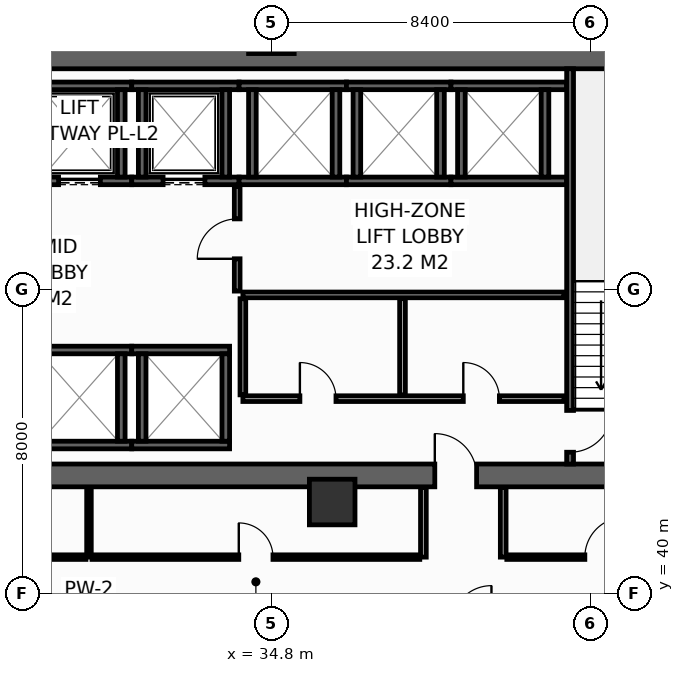
"""IFC4 building model, lengths in metres.
Left out: names, types, materials, properties, quantities, classifications, styles, units other than length and angle.
Written with IfcOpenShell. Run it as: python <this file> out.ifc"""

import sys

from ifc_helpers import new_model, si_unit, direction, frame, frame_2d, origin, origin_2d, place, context, subcontext, project, spatial, rectangle, hollow_rectangle, extrude, element, fill, save


model = new_model("IFC4")
c1 = context("Model", 3, precision=1e-05, world=origin(), true_north=direction((0.0, 1.0)))
c2 = subcontext(c1, "Body", "Model", "MODEL_VIEW")
j1 = project(units=[si_unit("LENGTHUNIT", "METRE"), si_unit("PLANEANGLEUNIT", "RADIAN")], contexts=[c1])
p1 = place(None, origin())
s1 = spatial("IfcSite", under=j1, at=p1, CompositionType="ELEMENT")
p2 = place(p1, origin())
s2 = spatial("IfcBuilding", under=s1, at=p2, CompositionType="ELEMENT")
p3 = place(p2, frame((0.0, 0.0, 51.6)))
s3 = spatial("IfcBuildingStorey", under=s2, at=p3, CompositionType="ELEMENT", Elevation=51.6)
p4 = place(p3, frame((13.5, 43.1, 0.0), z_axis=(0.0, 0.0, 1.0), x_axis=(1.0, 0.0, 0.0)))
e1 = element("IfcWall", 1, at=p4, inside=s3, PredefinedType="SHEAR", context=c2, shape_type="SweptSolid", body=[
    extrude(rectangle(XDim=32.9, YDim=0.6, at=frame_2d((16.45, 0.0))), origin(), (0.0, 0.0, 1.0), 4.15),
])
p5 = place(p4, frame((5.4, 0.0, 0.0)))
e2 = element("IfcOpeningElement", 2, at=p5, cuts=e1, PredefinedType="OPENING", context=c2, shape_type="SweptSolid", body=[
    extrude(rectangle(XDim=1.1, YDim=2.15, at=frame_2d((0.55, 1.075))), frame((0.0, 0.31, 0.0), z_axis=(0.0, -1.0, 0.0), x_axis=(1.0, 0.0, 0.0)), (0.0, 0.0, 1.0), 0.62),
])
p6 = place(p4, frame((25.6, 0.0, 0.0)))
e3 = element("IfcOpeningElement", 3, at=p6, cuts=e1, PredefinedType="OPENING", context=c2, shape_type="SweptSolid", body=[
    extrude(rectangle(XDim=1.1, YDim=2.15, at=frame_2d((0.55, 1.075))), frame((0.0, 0.31, 0.0), z_axis=(0.0, -1.0, 0.0), x_axis=(1.0, 0.0, 0.0)), (0.0, 0.0, 1.0), 0.62),
])
p7 = place(p3, frame((13.5, 54.1, 0.0), z_axis=(0.0, 0.0, 1.0), x_axis=(1.0, 0.0, 0.0)))
e4 = element("IfcWall", 4, at=p7, inside=s3, PredefinedType="SHEAR", context=c2, shape_type="SweptSolid", body=[
    extrude(rectangle(XDim=32.9, YDim=0.6, at=frame_2d((16.45, 0.0))), origin(), (0.0, 0.0, 1.0), 4.15),
])
for number, where, z_axis, x_axis in (
    (5, (34.8, 54.8, 0.0), (0.0, 0.0, 1.0), (1.0, 0.0, 0.0)),
    (6, (36.4, 42.4, 0.0), (0.0, 0.0, 1.0), (1.0, 0.0, 0.0)),
):
    element("IfcColumn", number, at=place(p3, frame(where, z_axis=z_axis, x_axis=x_axis)), inside=s3, PredefinedType="COLUMN", context=c2, shape_type="SweptSolid", body=[
        extrude(hollow_rectangle(XDim=1.2, YDim=1.2, WallThickness=0.055, at=origin_2d()), origin(), (0.0, 0.0, 1.0), 4.4),
    ])
p8 = place(p3, frame((28.375, 50.85, 0.0), z_axis=(0.0, 0.0, 1.0), x_axis=(1.0, 0.0, 0.0)))
e7 = element("IfcWall", 7, at=p8, inside=s3, PredefinedType="SHEAR", context=c2, shape_type="SweptSolid", body=[
    extrude(rectangle(XDim=2.75, YDim=0.2, at=frame_2d((1.375, 0.0))), origin(), (0.0, 0.0, 1.0), 4.15),
])
p9 = place(p8, frame((0.825, 0.0, 0.0)))
e8 = element("IfcOpeningElement", 8, at=p9, cuts=e7, PredefinedType="OPENING", context=c2, shape_type="SweptSolid", body=[
    extrude(rectangle(XDim=1.1, YDim=2.2, at=frame_2d((0.55, 1.1))), frame((0.0, 0.11, 0.0), z_axis=(0.0, -1.0, 0.0), x_axis=(1.0, 0.0, 0.0)), (0.0, 0.0, 1.0), 0.22),
])
p10 = place(p3, frame((28.375, 53.35, 0.0), z_axis=(0.0, 0.0, 1.0), x_axis=(1.0, 0.0, 0.0)))
e9 = element("IfcWall", 9, at=p10, inside=s3, PredefinedType="SHEAR", context=c2, shape_type="SweptSolid", body=[
    extrude(rectangle(XDim=2.75, YDim=0.2, at=frame_2d((1.375, 0.0))), origin(), (0.0, 0.0, 1.0), 4.15),
])
p11 = place(p3, frame((30.85, 50.95, 0.0), z_axis=(0.0, 0.0, 1.0), x_axis=(0.0, 1.0, 0.0)))
e10 = element("IfcWall", 10, at=p11, inside=s3, PredefinedType="SHEAR", context=c2, shape_type="SweptSolid", body=[
    extrude(rectangle(XDim=2.3, YDim=0.2, at=frame_2d((1.15, 0.0))), origin(), (0.0, 0.0, 1.0), 4.15),
])
p12 = place(p3, frame((31.125, 50.85, 0.0), z_axis=(0.0, 0.0, 1.0), x_axis=(1.0, 0.0, 0.0)))
e11 = element("IfcWall", 11, at=p12, inside=s3, PredefinedType="SHEAR", context=c2, shape_type="SweptSolid", body=[
    extrude(rectangle(XDim=2.825, YDim=0.2, at=frame_2d((1.413, 0.0))), origin(), (0.0, 0.0, 1.0), 4.15),
])
p13 = place(p12, frame((0.825, 0.0, 0.0)))
e12 = element("IfcOpeningElement", 12, at=p13, cuts=e11, PredefinedType="OPENING", context=c2, shape_type="SweptSolid", body=[
    extrude(rectangle(XDim=1.1, YDim=2.2, at=frame_2d((0.55, 1.1))), frame((0.0, 0.11, 0.0), z_axis=(0.0, -1.0, 0.0), x_axis=(1.0, 0.0, 0.0)), (0.0, 0.0, 1.0), 0.22),
])
p14 = place(p3, frame((31.125, 53.35, 0.0), z_axis=(0.0, 0.0, 1.0), x_axis=(1.0, 0.0, 0.0)))
e13 = element("IfcWall", 13, at=p14, inside=s3, PredefinedType="SHEAR", context=c2, shape_type="SweptSolid", body=[
    extrude(rectangle(XDim=2.825, YDim=0.2, at=frame_2d((1.413, 0.0))), origin(), (0.0, 0.0, 1.0), 4.15),
])
for number, where, z_axis, x_axis in (
    (14, (31.4, 50.95, 0.0), (0.0, 0.0, 1.0), (0.0, 1.0, 0.0)),
    (15, (33.6, 50.95, 0.0), (0.0, 0.0, 1.0), (0.0, 1.0, 0.0)),
):
    element("IfcWall", number, at=place(p3, frame(where, z_axis=z_axis, x_axis=x_axis)), inside=s3, PredefinedType="SHEAR", context=c2, shape_type="SweptSolid", body=[
        extrude(rectangle(XDim=2.3, YDim=0.2, at=frame_2d((1.15, 0.0))), origin(), (0.0, 0.0, 1.0), 4.15),
    ])
for number, where, z_axis, x_axis in (
    (16, (28.375, 43.9, 0.0), (0.0, 0.0, 1.0), (1.0, 0.0, 0.0)),
    (17, (28.375, 46.4, 0.0), (0.0, 0.0, 1.0), (1.0, 0.0, 0.0)),
):
    element("IfcWall", number, at=place(p3, frame(where, z_axis=z_axis, x_axis=x_axis)), inside=s3, PredefinedType="SHEAR", context=c2, shape_type="SweptSolid", body=[
        extrude(rectangle(XDim=2.75, YDim=0.2, at=frame_2d((1.375, 0.0))), origin(), (0.0, 0.0, 1.0), 4.15),
    ])
p15 = place(p3, frame((30.85, 44.0, 0.0), z_axis=(0.0, 0.0, 1.0), x_axis=(0.0, 1.0, 0.0)))
e18 = element("IfcWall", 18, at=p15, inside=s3, PredefinedType="SHEAR", context=c2, shape_type="SweptSolid", body=[
    extrude(rectangle(XDim=2.3, YDim=0.2, at=frame_2d((1.15, 0.0))), origin(), (0.0, 0.0, 1.0), 4.15),
])
for number, where, z_axis, x_axis in (
    (19, (31.125, 43.9, 0.0), (0.0, 0.0, 1.0), (1.0, 0.0, 0.0)),
    (20, (31.125, 46.4, 0.0), (0.0, 0.0, 1.0), (1.0, 0.0, 0.0)),
):
    element("IfcWall", number, at=place(p3, frame(where, z_axis=z_axis, x_axis=x_axis)), inside=s3, PredefinedType="SHEAR", context=c2, shape_type="SweptSolid", body=[
        extrude(rectangle(XDim=2.575, YDim=0.2, at=frame_2d((1.288, 0.0))), origin(), (0.0, 0.0, 1.0), 4.15),
    ])
for number, where, z_axis, x_axis in (
    (21, (31.4, 44.0, 0.0), (0.0, 0.0, 1.0), (0.0, 1.0, 0.0)),
    (22, (33.6, 44.0, 0.0), (0.0, 0.0, 1.0), (0.0, 1.0, 0.0)),
):
    element("IfcWall", number, at=place(p3, frame(where, z_axis=z_axis, x_axis=x_axis)), inside=s3, PredefinedType="SHEAR", context=c2, shape_type="SweptSolid", body=[
        extrude(rectangle(XDim=2.3, YDim=0.2, at=frame_2d((1.15, 0.0))), origin(), (0.0, 0.0, 1.0), 4.15),
    ])
for number, where, z_axis, x_axis in (
    (23, (33.95, 50.85, 0.0), (0.0, 0.0, 1.0), (1.0, 0.0, 0.0)),
    (24, (33.95, 53.35, 0.0), (0.0, 0.0, 1.0), (1.0, 0.0, 0.0)),
):
    element("IfcWall", number, at=place(p3, frame(where, z_axis=z_axis, x_axis=x_axis)), inside=s3, PredefinedType="SHEAR", context=c2, shape_type="SweptSolid", body=[
        extrude(rectangle(XDim=2.825, YDim=0.2, at=frame_2d((1.413, 0.0))), origin(), (0.0, 0.0, 1.0), 4.15),
    ])
for number, where, z_axis, x_axis in (
    (25, (34.3, 50.95, 0.0), (0.0, 0.0, 1.0), (0.0, 1.0, 0.0)),
    (26, (36.5, 50.95, 0.0), (0.0, 0.0, 1.0), (0.0, 1.0, 0.0)),
):
    element("IfcWall", number, at=place(p3, frame(where, z_axis=z_axis, x_axis=x_axis)), inside=s3, PredefinedType="SHEAR", context=c2, shape_type="SweptSolid", body=[
        extrude(rectangle(XDim=2.3, YDim=0.2, at=frame_2d((1.15, 0.0))), origin(), (0.0, 0.0, 1.0), 4.15),
    ])
for number, where, z_axis, x_axis in (
    (27, (36.775, 50.85, 0.0), (0.0, 0.0, 1.0), (1.0, 0.0, 0.0)),
    (28, (36.775, 53.35, 0.0), (0.0, 0.0, 1.0), (1.0, 0.0, 0.0)),
):
    element("IfcWall", number, at=place(p3, frame(where, z_axis=z_axis, x_axis=x_axis)), inside=s3, PredefinedType="SHEAR", context=c2, shape_type="SweptSolid", body=[
        extrude(rectangle(XDim=2.75, YDim=0.2, at=frame_2d((1.375, 0.0))), origin(), (0.0, 0.0, 1.0), 4.15),
    ])
for number, where, z_axis, x_axis in (
    (29, (37.05, 50.95, 0.0), (0.0, 0.0, 1.0), (0.0, 1.0, 0.0)),
    (30, (39.25, 50.95, 0.0), (0.0, 0.0, 1.0), (0.0, 1.0, 0.0)),
):
    element("IfcWall", number, at=place(p3, frame(where, z_axis=z_axis, x_axis=x_axis)), inside=s3, PredefinedType="SHEAR", context=c2, shape_type="SweptSolid", body=[
        extrude(rectangle(XDim=2.3, YDim=0.2, at=frame_2d((1.15, 0.0))), origin(), (0.0, 0.0, 1.0), 4.15),
    ])
for number, where, z_axis, x_axis in (
    (31, (39.525, 50.85, 0.0), (0.0, 0.0, 1.0), (1.0, 0.0, 0.0)),
    (32, (39.525, 53.35, 0.0), (0.0, 0.0, 1.0), (1.0, 0.0, 0.0)),
):
    element("IfcWall", number, at=place(p3, frame(where, z_axis=z_axis, x_axis=x_axis)), inside=s3, PredefinedType="SHEAR", context=c2, shape_type="SweptSolid", body=[
        extrude(rectangle(XDim=3.045, YDim=0.2, at=frame_2d((1.522, 0.0))), origin(), (0.0, 0.0, 1.0), 4.15),
    ])
for number, where, z_axis, x_axis in (
    (33, (39.8, 50.95, 0.0), (0.0, 0.0, 1.0), (0.0, 1.0, 0.0)),
    (34, (42.0, 50.95, 0.0), (0.0, 0.0, 1.0), (0.0, 1.0, 0.0)),
):
    element("IfcWall", number, at=place(p3, frame(where, z_axis=z_axis, x_axis=x_axis)), inside=s3, PredefinedType="SHEAR", context=c2, shape_type="SweptSolid", body=[
        extrude(rectangle(XDim=2.3, YDim=0.2, at=frame_2d((1.15, 0.0))), origin(), (0.0, 0.0, 1.0), 4.15),
    ])
p16 = place(p3, frame((42.66, 53.8, 0.0), z_axis=(0.0, 0.0, 1.0), x_axis=(0.0, -1.0, 0.0)))
e35 = element("IfcWall", 35, at=p16, inside=s3, PredefinedType="SHEAR", context=c2, shape_type="SweptSolid", body=[
    extrude(rectangle(XDim=10.4, YDim=0.18, at=frame_2d((5.2, 0.0))), origin(), (0.0, 0.0, 1.0), 4.15),
])
p17 = place(p16, frame((8.99, 0.0, 0.0)))
e36 = element("IfcOpeningElement", 36, at=p17, cuts=e35, PredefinedType="OPENING", context=c2, shape_type="SweptSolid", body=[
    extrude(rectangle(XDim=1.1, YDim=2.15, at=frame_2d((0.55, 1.075))), frame((0.0, 0.1, 0.0), z_axis=(0.0, -1.0, 0.0), x_axis=(1.0, 0.0, 0.0)), (0.0, 0.0, 1.0), 0.2),
])
p18 = place(p3, frame((33.9, 47.95, 0.0), z_axis=(0.0, 0.0, 1.0), x_axis=(0.0, 1.0, 0.0)))
e37 = element("IfcWall", 37, at=p18, inside=s3, PredefinedType="PARTITIONING", context=c2, shape_type="SweptSolid", body=[
    extrude(rectangle(XDim=2.75, YDim=0.15, at=frame_2d((1.375, 0.0))), origin(), (0.0, 0.0, 1.0), 4.15),
])
p19 = place(p18, frame((0.85, 0.0, 0.0)))
e38 = element("IfcOpeningElement", 38, at=p19, cuts=e37, PredefinedType="OPENING", context=c2, shape_type="SweptSolid", body=[
    extrude(rectangle(XDim=1.05, YDim=2.15, at=frame_2d((0.525, 1.075))), frame((0.0, 0.085, 0.0), z_axis=(0.0, -1.0, 0.0), x_axis=(1.0, 0.0, 0.0)), (0.0, 0.0, 1.0), 0.17),
])
p20 = place(p3, frame((34.05, 45.12, 0.0), z_axis=(0.0, 0.0, 1.0), x_axis=(1.0, 0.0, 0.0)))
e39 = element("IfcWall", 39, at=p20, inside=s3, PredefinedType="PARTITIONING", context=c2, shape_type="SweptSolid", body=[
    extrude(rectangle(XDim=8.45, YDim=0.15, at=frame_2d((4.225, 0.0))), origin(), (0.0, 0.0, 1.0), 4.15),
])
p21 = place(p20, frame((1.5, 0.0, 0.0)))
e40 = element("IfcOpeningElement", 40, at=p21, cuts=e39, PredefinedType="OPENING", context=c2, shape_type="SweptSolid", body=[
    extrude(rectangle(XDim=0.95, YDim=2.15, at=frame_2d((0.475, 1.075))), frame((0.0, 0.085, 0.0), z_axis=(0.0, -1.0, 0.0), x_axis=(1.0, 0.0, 0.0)), (0.0, 0.0, 1.0), 0.17),
])
p22 = place(p20, frame((5.8, 0.0, 0.0)))
e41 = element("IfcOpeningElement", 41, at=p22, cuts=e39, PredefinedType="OPENING", context=c2, shape_type="SweptSolid", body=[
    extrude(rectangle(XDim=0.95, YDim=2.15, at=frame_2d((0.475, 1.075))), frame((0.0, 0.085, 0.0), z_axis=(0.0, -1.0, 0.0), x_axis=(1.0, 0.0, 0.0)), (0.0, 0.0, 1.0), 0.17),
])
p23 = place(p3, frame((34.05, 47.85, 0.0), z_axis=(0.0, 0.0, 1.0), x_axis=(1.0, 0.0, 0.0)))
e42 = element("IfcWall", 42, at=p23, inside=s3, PredefinedType="PARTITIONING", context=c2, shape_type="SweptSolid", body=[
    extrude(rectangle(XDim=8.45, YDim=0.15, at=frame_2d((4.225, 0.0))), origin(), (0.0, 0.0, 1.0), 4.15),
])
for number, where, z_axis, x_axis in (
    (43, (38.25, 45.22, 0.0), (0.0, 0.0, 1.0), (0.0, 1.0, 0.0)),
    (44, (34.05, 45.22, 0.0), (0.0, 0.0, 1.0), (0.0, 1.0, 0.0)),
):
    element("IfcWall", number, at=place(p3, frame(where, z_axis=z_axis, x_axis=x_axis)), inside=s3, PredefinedType="PARTITIONING", context=c2, shape_type="SweptSolid", body=[
        extrude(rectangle(XDim=2.53, YDim=0.15, at=frame_2d((1.265, 0.0))), origin(), (0.0, 0.0, 1.0), 4.15),
    ])
for number, where, z_axis, x_axis in (
    (45, (38.8, 40.95, 0.0), (0.0, 0.0, 1.0), (0.0, 1.0, 0.0)),
    (46, (40.9, 40.95, 0.0), (0.0, 0.0, 1.0), (0.0, 1.0, 0.0)),
):
    element("IfcWall", number, at=place(p3, frame(where, z_axis=z_axis, x_axis=x_axis)), inside=s3, PredefinedType="PARTITIONING", context=c2, shape_type="SweptSolid", body=[
        extrude(rectangle(XDim=1.83, YDim=0.15, at=frame_2d((0.915, 0.0))), origin(), (0.0, 0.0, 1.0), 4.15),
    ])
p24 = place(p3, frame((30.0, 40.95, 0.0), z_axis=(0.0, 0.0, 1.0), x_axis=(0.0, 1.0, 0.0)))
e47 = element("IfcWall", 47, at=p24, inside=s3, PredefinedType="PARTITIONING", context=c2, shape_type="SweptSolid", body=[
    extrude(rectangle(XDim=1.83, YDim=0.12, at=frame_2d((0.915, 0.0))), origin(), (0.0, 0.0, 1.0), 3.335),
])
p25 = place(p3, frame((20.795, 40.95, 0.0), z_axis=(0.0, 0.0, 1.0), x_axis=(1.0, 0.0, 0.0)))
e48 = element("IfcWall", 48, at=p25, inside=s3, PredefinedType="PARTITIONING", context=c2, shape_type="SweptSolid", body=[
    extrude(rectangle(XDim=9.125, YDim=0.12, at=frame_2d((4.562, 0.0))), origin(), (0.0, 0.0, 1.0), 3.335),
])
p26 = place(p25, frame((4.037, 0.0, 0.0)))
e49 = element("IfcOpeningElement", 49, at=p26, cuts=e48, PredefinedType="OPENING", context=c2, shape_type="SweptSolid", body=[
    extrude(rectangle(XDim=1.05, YDim=2.15, at=frame_2d((0.525, 1.075))), frame((0.0, 0.07, 0.0), z_axis=(0.0, -1.0, 0.0), x_axis=(1.0, 0.0, 0.0)), (0.0, 0.0, 1.0), 0.14),
])
p27 = place(p3, frame((30.08, 40.95, 0.0), z_axis=(0.0, 0.0, 1.0), x_axis=(1.0, 0.0, 0.0)))
e50 = element("IfcWall", 50, at=p27, inside=s3, PredefinedType="PARTITIONING", context=c2, shape_type="SweptSolid", body=[
    extrude(rectangle(XDim=8.625, YDim=0.12, at=frame_2d((4.312, 0.0))), origin(), (0.0, 0.0, 1.0), 3.335),
])
p28 = place(p27, frame((3.862, 0.0, 0.0)))
e51 = element("IfcOpeningElement", 51, at=p28, cuts=e50, PredefinedType="OPENING", context=c2, shape_type="SweptSolid", body=[
    extrude(rectangle(XDim=0.9, YDim=2.1, at=frame_2d((0.45, 1.05))), frame((0.0, 0.07, 0.0), z_axis=(0.0, -1.0, 0.0), x_axis=(1.0, 0.0, 0.0)), (0.0, 0.0, 1.0), 0.14),
])
p29 = place(p3, frame((40.995, 40.95, 0.0), z_axis=(0.0, 0.0, 1.0), x_axis=(1.0, 0.0, 0.0)))
e52 = element("IfcWall", 52, at=p29, inside=s3, PredefinedType="PARTITIONING", context=c2, shape_type="SweptSolid", body=[
    extrude(rectangle(XDim=5.155, YDim=0.12, at=frame_2d((2.577, 0.0))), origin(), (0.0, 0.0, 1.0), 4.15),
])
p30 = place(p29, frame((2.053, 0.0, 0.0)))
e53 = element("IfcOpeningElement", 53, at=p30, cuts=e52, PredefinedType="OPENING", context=c2, shape_type="SweptSolid", body=[
    extrude(rectangle(XDim=1.05, YDim=2.15, at=frame_2d((0.525, 1.075))), frame((0.0, 0.07, 0.0), z_axis=(0.0, -1.0, 0.0), x_axis=(1.0, 0.0, 0.0)), (0.0, 0.0, 1.0), 0.14),
])
p31 = place(p9, origin())
e54 = element("IfcDoor", 54, at=p31, inside=s3, OperationType="SLIDING_TO_LEFT", PredefinedType="DOOR", context=c2, shape_type="SweptSolid", body=[
    extrude(rectangle(XDim=1.1, YDim=2.2, at=frame_2d((0.55, 1.1))), frame((0.0, 0.025, 0.0), z_axis=(0.0, -1.0, 0.0), x_axis=(1.0, 0.0, 0.0)), (0.0, 0.0, 1.0), 0.05),
])
fill(e8, e54)
p32 = place(p13, origin())
e55 = element("IfcDoor", 55, at=p32, inside=s3, OperationType="SLIDING_TO_LEFT", PredefinedType="DOOR", context=c2, shape_type="SweptSolid", body=[
    extrude(rectangle(XDim=1.1, YDim=2.2, at=frame_2d((0.55, 1.1))), frame((0.0, 0.025, 0.0), z_axis=(0.0, -1.0, 0.0), x_axis=(1.0, 0.0, 0.0)), (0.0, 0.0, 1.0), 0.05),
])
fill(e12, e55)
p33 = place(p17, origin())
e56 = element("IfcDoor", 56, at=p33, inside=s3, OperationType="SINGLE_SWING_LEFT", PredefinedType="DOOR", context=c2, shape_type="SweptSolid", body=[
    extrude(rectangle(XDim=1.1, YDim=2.15, at=frame_2d((0.55, 1.075))), frame((0.0, 0.025, 0.0), z_axis=(0.0, -1.0, 0.0), x_axis=(1.0, 0.0, 0.0)), (0.0, 0.0, 1.0), 0.05),
])
fill(e36, e56)
p34 = place(p6, origin())
e57 = element("IfcDoor", 57, at=p34, inside=s3, OperationType="SINGLE_SWING_LEFT", PredefinedType="DOOR", context=c2, shape_type="SweptSolid", body=[
    extrude(rectangle(XDim=1.1, YDim=2.15, at=frame_2d((0.55, 1.075))), frame((0.0, 0.025, 0.0), z_axis=(0.0, -1.0, 0.0), x_axis=(1.0, 0.0, 0.0)), (0.0, 0.0, 1.0), 0.05),
])
fill(e3, e57)
p35 = place(p19, origin())
e58 = element("IfcDoor", 58, at=p35, inside=s3, OperationType="SINGLE_SWING_LEFT", PredefinedType="DOOR", context=c2, shape_type="SweptSolid", body=[
    extrude(rectangle(XDim=1.05, YDim=2.15, at=frame_2d((0.525, 1.075))), frame((0.0, 0.025, 0.0), z_axis=(0.0, -1.0, 0.0), x_axis=(1.0, 0.0, 0.0)), (0.0, 0.0, 1.0), 0.05),
])
fill(e38, e58)
p36 = place(p21, origin())
e59 = element("IfcDoor", 59, at=p36, inside=s3, OperationType="SINGLE_SWING_LEFT", PredefinedType="DOOR", context=c2, shape_type="SweptSolid", body=[
    extrude(rectangle(XDim=0.95, YDim=2.15, at=frame_2d((0.475, 1.075))), frame((0.0, 0.025, 0.0), z_axis=(0.0, -1.0, 0.0), x_axis=(1.0, 0.0, 0.0)), (0.0, 0.0, 1.0), 0.05),
])
fill(e40, e59)
p37 = place(p22, origin())
e60 = element("IfcDoor", 60, at=p37, inside=s3, OperationType="SINGLE_SWING_LEFT", PredefinedType="DOOR", context=c2, shape_type="SweptSolid", body=[
    extrude(rectangle(XDim=0.95, YDim=2.15, at=frame_2d((0.475, 1.075))), frame((0.0, 0.025, 0.0), z_axis=(0.0, -1.0, 0.0), x_axis=(1.0, 0.0, 0.0)), (0.0, 0.0, 1.0), 0.05),
])
fill(e41, e60)
p38 = place(p28, origin())
e61 = element("IfcDoor", 61, at=p38, inside=s3, OperationType="SINGLE_SWING_LEFT", PredefinedType="DOOR", context=c2, shape_type="SweptSolid", body=[
    extrude(rectangle(XDim=0.9, YDim=2.1, at=frame_2d((0.45, 1.05))), frame((0.0, 0.025, 0.0), z_axis=(0.0, -1.0, 0.0), x_axis=(1.0, 0.0, 0.0)), (0.0, 0.0, 1.0), 0.05),
])
fill(e51, e61)
p39 = place(p30, origin())
e62 = element("IfcDoor", 62, at=p39, inside=s3, OperationType="SINGLE_SWING_RIGHT", PredefinedType="DOOR", context=c2, shape_type="SweptSolid", body=[
    extrude(rectangle(XDim=1.05, YDim=2.15, at=frame_2d((0.525, 1.075))), frame((0.0, 0.025, 0.0), z_axis=(0.0, -1.0, 0.0), x_axis=(1.0, 0.0, 0.0)), (0.0, 0.0, 1.0), 0.05),
])
fill(e53, e62)
save(model, sys.argv[1])
